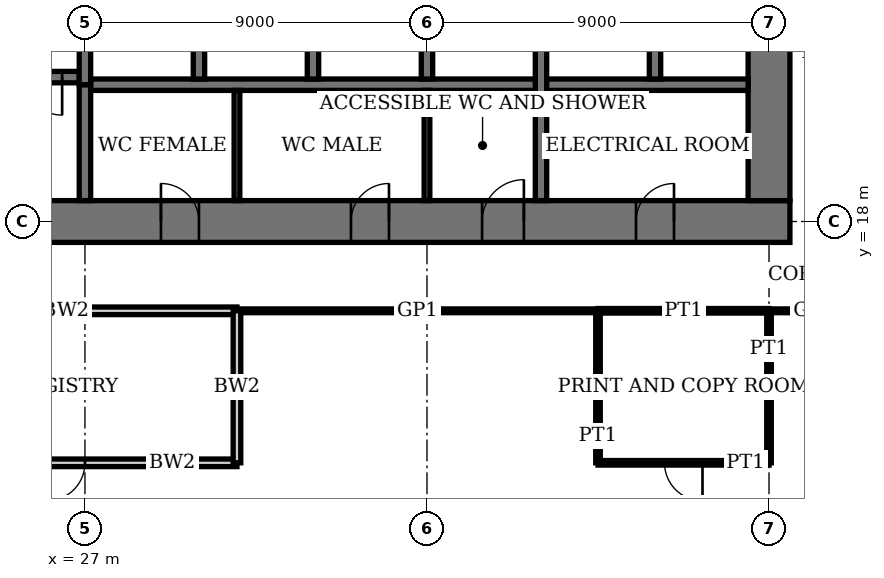
"""IFC4 building model, lengths in metres.
Left out: names, types, materials, properties, quantities, classifications, styles, units other than length and angle.
Written with IfcOpenShell. Run it as: python <this file> out.ifc"""

import sys

from ifc_helpers import new_model, si_unit, direction, frame, frame_2d, origin, place, context, subcontext, project, spatial, rectangle, extrude, element, fill, save


model = new_model("IFC4")
c1 = context("Model", 3, precision=1e-05, world=origin(), true_north=direction((0.0, 1.0)))
c2 = subcontext(c1, "Body", "Model", "MODEL_VIEW")
j1 = project(units=[si_unit("LENGTHUNIT", "METRE"), si_unit("PLANEANGLEUNIT", "RADIAN")], contexts=[c1])
p1 = place(None, origin())
s1 = spatial("IfcSite", under=j1, at=p1, CompositionType="ELEMENT")
p2 = place(p1, origin())
s2 = spatial("IfcBuilding", under=s1, at=p2, CompositionType="ELEMENT")
p3 = place(p2, frame((0.0, 0.0, 19.8)))
s3 = spatial("IfcBuildingStorey", under=s2, at=p3, CompositionType="ELEMENT", Elevation=19.8)
p4 = place(p3, frame((17.45, 18.0, 0.0), z_axis=(0.0, 0.0, 1.0), x_axis=(1.0, 0.0, 0.0)))
e1 = element("IfcWall", 1, at=p4, inside=s3, PredefinedType="SHEAR", context=c2, shape_type="SweptSolid", body=[
    extrude(rectangle(XDim=28.1, YDim=1.1, at=frame_2d((14.05, 0.0))), origin(), (0.0, 0.0, 1.0), 4.0),
])
p5 = place(p4, frame((11.55, 0.0, 0.0)))
e2 = element("IfcOpeningElement", 2, at=p5, cuts=e1, PredefinedType="OPENING", context=c2, shape_type="SweptSolid", body=[
    extrude(rectangle(XDim=1.0, YDim=2.4, at=frame_2d((0.5, 1.2))), frame((0.0, 0.56, 0.0), z_axis=(0.0, -1.0, 0.0), x_axis=(1.0, 0.0, 0.0)), (0.0, 0.0, 1.0), 1.12),
])
p6 = place(p4, frame((16.55, 0.0, 0.0)))
e3 = element("IfcOpeningElement", 3, at=p6, cuts=e1, PredefinedType="OPENING", context=c2, shape_type="SweptSolid", body=[
    extrude(rectangle(XDim=1.0, YDim=2.4, at=frame_2d((0.5, 1.2))), frame((0.0, 0.56, 0.0), z_axis=(0.0, -1.0, 0.0), x_axis=(1.0, 0.0, 0.0)), (0.0, 0.0, 1.0), 1.12),
])
p7 = place(p4, frame((20.0, 0.0, 0.0)))
e4 = element("IfcOpeningElement", 4, at=p7, cuts=e1, PredefinedType="OPENING", context=c2, shape_type="SweptSolid", body=[
    extrude(rectangle(XDim=1.1, YDim=2.4, at=frame_2d((0.55, 1.2))), frame((0.0, 0.56, 0.0), z_axis=(0.0, -1.0, 0.0), x_axis=(1.0, 0.0, 0.0)), (0.0, 0.0, 1.0), 1.12),
])
p8 = place(p4, frame((24.05, 0.0, 0.0)))
e5 = element("IfcOpeningElement", 5, at=p8, cuts=e1, PredefinedType="OPENING", context=c2, shape_type="SweptSolid", body=[
    extrude(rectangle(XDim=1.0, YDim=2.4, at=frame_2d((0.5, 1.2))), frame((0.0, 0.56, 0.0), z_axis=(0.0, -1.0, 0.0), x_axis=(1.0, 0.0, 0.0)), (0.0, 0.0, 1.0), 1.12),
])
p9 = place(p3, frame((45.0, 18.55, 0.0), z_axis=(0.0, 0.0, 1.0), x_axis=(0.0, 1.0, 0.0)))
e6 = element("IfcWall", 6, at=p9, inside=s3, PredefinedType="SHEAR", context=c2, shape_type="SweptSolid", body=[
    extrude(rectangle(XDim=16.9, YDim=1.1, at=frame_2d((8.45, 0.0))), origin(), (0.0, 0.0, 1.0), 4.0),
])
p10 = place(p9, frame((8.45, 0.0, 0.0)))
e7 = element("IfcOpeningElement", 7, at=p10, cuts=e6, PredefinedType="OPENING", context=c2, shape_type="SweptSolid", body=[
    extrude(rectangle(XDim=1.8, YDim=2.4, at=frame_2d((0.9, 1.2))), frame((0.0, 0.56, 0.0), z_axis=(0.0, -1.0, 0.0), x_axis=(1.0, 0.0, 0.0)), (0.0, 0.0, 1.0), 1.12),
])
p11 = place(p3, frame((18.55, 21.8, 0.0), z_axis=(0.0, 0.0, 1.0), x_axis=(1.0, 0.0, 0.0)))
e8 = element("IfcWall", 8, at=p11, inside=s3, PredefinedType="SHEAR", context=c2, shape_type="SweptSolid", body=[
    extrude(rectangle(XDim=8.3, YDim=0.3, at=frame_2d((4.15, 0.0))), origin(), (0.0, 0.0, 1.0), 4.0),
])
p12 = place(p11, frame((6.85, 0.0, 0.0)))
e9 = element("IfcOpeningElement", 9, at=p12, cuts=e8, PredefinedType="OPENING", context=c2, shape_type="SweptSolid", body=[
    extrude(rectangle(XDim=1.0, YDim=2.4, at=frame_2d((0.5, 1.2))), frame((0.0, 0.16, 0.0), z_axis=(0.0, -1.0, 0.0), x_axis=(1.0, 0.0, 0.0)), (0.0, 0.0, 1.0), 0.32),
])
p13 = place(p3, frame((27.0, 18.55, 0.0), z_axis=(0.0, 0.0, 1.0), x_axis=(0.0, 1.0, 0.0)))
e10 = element("IfcWall", 10, at=p13, inside=s3, PredefinedType="SHEAR", context=c2, shape_type="SweptSolid", body=[
    extrude(rectangle(XDim=3.05, YDim=0.3, at=frame_2d((1.525, 0.0))), origin(), (0.0, 0.0, 1.0), 4.0),
])
p14 = place(p3, frame((27.15, 21.6, 0.0), z_axis=(0.0, 0.0, 1.0), x_axis=(1.0, 0.0, 0.0)))
e11 = element("IfcWall", 11, at=p14, inside=s3, PredefinedType="SHEAR", context=c2, shape_type="SweptSolid", body=[
    extrude(rectangle(XDim=17.3, YDim=0.3, at=frame_2d((8.65, 0.0))), origin(), (0.0, 0.0, 1.0), 4.0),
])
for number, where, z_axis, x_axis in (
    (12, (30.0, 21.75, 0.0), (0.0, 0.0, 1.0), (0.0, 1.0, 0.0)),
    (13, (33.0, 21.75, 0.0), (0.0, 0.0, 1.0), (0.0, 1.0, 0.0)),
    (14, (36.0, 21.75, 0.0), (0.0, 0.0, 1.0), (0.0, 1.0, 0.0)),
):
    element("IfcWall", number, at=place(p3, frame(where, z_axis=z_axis, x_axis=x_axis)), inside=s3, PredefinedType="SHEAR", context=c2, shape_type="SweptSolid", body=[
        extrude(rectangle(XDim=2.7, YDim=0.3, at=frame_2d((1.35, 0.0))), origin(), (0.0, 0.0, 1.0), 4.0),
    ])
p15 = place(p3, frame((39.0, 18.55, 0.0), z_axis=(0.0, 0.0, 1.0), x_axis=(0.0, 1.0, 0.0)))
e15 = element("IfcWall", 15, at=p15, inside=s3, PredefinedType="SHEAR", context=c2, shape_type="SweptSolid", body=[
    extrude(rectangle(XDim=5.9, YDim=0.3, at=frame_2d((2.95, 0.0))), origin(), (0.0, 0.0, 1.0), 4.0),
])
p16 = place(p3, frame((42.0, 21.75, 0.0), z_axis=(0.0, 0.0, 1.0), x_axis=(0.0, 1.0, 0.0)))
e16 = element("IfcWall", 16, at=p16, inside=s3, PredefinedType="SHEAR", context=c2, shape_type="SweptSolid", body=[
    extrude(rectangle(XDim=2.7, YDim=0.3, at=frame_2d((1.35, 0.0))), origin(), (0.0, 0.0, 1.0), 4.0),
])
p17 = place(p3, frame((27.0, 21.6, 0.0), z_axis=(0.0, 0.0, 1.0), x_axis=(0.0, 1.0, 0.0)))
e17 = element("IfcWall", 17, at=p17, inside=s3, PredefinedType="SHEAR", context=c2, shape_type="SweptSolid", body=[
    extrude(rectangle(XDim=2.85, YDim=0.3, at=frame_2d((1.425, 0.0))), origin(), (0.0, 0.0, 1.0), 4.0),
])
p18 = place(p3, frame((22.0, 11.65, 0.0), z_axis=(0.0, 0.0, 1.0), x_axis=(1.0, 0.0, 0.0)))
e18 = element("IfcWall", 18, at=p18, inside=s3, PredefinedType="SOLIDWALL", context=c2, shape_type="SweptSolid", body=[
    extrude(rectangle(XDim=9.0, YDim=0.2, at=frame_2d((4.5, 0.0))), origin(), (0.0, 0.0, 1.0), 3.75),
])
p19 = place(p18, frame((4.0, 0.0, 0.0)))
e19 = element("IfcOpeningElement", 19, at=p19, cuts=e18, PredefinedType="OPENING", context=c2, shape_type="SweptSolid", body=[
    extrude(rectangle(XDim=1.0, YDim=2.4, at=frame_2d((0.5, 1.2))), frame((0.0, 0.11, 0.0), z_axis=(0.0, -1.0, 0.0), x_axis=(1.0, 0.0, 0.0)), (0.0, 0.0, 1.0), 0.22),
])
p20 = place(p3, frame((40.5, 11.65, 0.0), z_axis=(0.0, 0.0, 1.0), x_axis=(1.0, 0.0, 0.0)))
e20 = element("IfcWall", 20, at=p20, inside=s3, PredefinedType="PARTITIONING", context=c2, shape_type="SweptSolid", body=[
    extrude(rectangle(XDim=4.5, YDim=0.12, at=frame_2d((2.25, 0.0))), origin(), (0.0, 0.0, 1.0), 3.75),
])
p21 = place(p20, frame((1.75, 0.0, 0.0)))
e21 = element("IfcOpeningElement", 21, at=p21, cuts=e20, PredefinedType="OPENING", context=c2, shape_type="SweptSolid", body=[
    extrude(rectangle(XDim=1.0, YDim=2.4, at=frame_2d((0.5, 1.2))), frame((0.0, 0.07, 0.0), z_axis=(0.0, -1.0, 0.0), x_axis=(1.0, 0.0, 0.0)), (0.0, 0.0, 1.0), 0.14),
])
p22 = place(p3, frame((22.0, 15.65, 0.0), z_axis=(0.0, 0.0, 1.0), x_axis=(1.0, 0.0, 0.0)))
e22 = element("IfcWall", 22, at=p22, inside=s3, PredefinedType="SOLIDWALL", context=c2, shape_type="SweptSolid", body=[
    extrude(rectangle(XDim=9.0, YDim=0.2, at=frame_2d((4.5, 0.0))), origin(), (0.0, 0.0, 1.0), 3.75),
])
p23 = place(p3, frame((40.5, 15.65, 0.0), z_axis=(0.0, 0.0, 1.0), x_axis=(1.0, 0.0, 0.0)))
e23 = element("IfcWall", 23, at=p23, inside=s3, PredefinedType="PARTITIONING", context=c2, shape_type="SweptSolid", body=[
    extrude(rectangle(XDim=4.5, YDim=0.12, at=frame_2d((2.25, 0.0))), origin(), (0.0, 0.0, 1.0), 3.75),
])
p24 = place(p3, frame((31.0, 15.65, 0.0), z_axis=(0.0, 0.0, 1.0), x_axis=(1.0, 0.0, 0.0)))
e24 = element("IfcWall", 24, at=p24, inside=s3, PredefinedType="PARTITIONING", context=c2, shape_type="SweptSolid", body=[
    extrude(rectangle(XDim=9.5, YDim=0.1, at=frame_2d((4.75, 0.0))), origin(), (0.0, 0.0, 1.0), 3.75),
])
p25 = place(p3, frame((45.0, 15.65, 0.0), z_axis=(0.0, 0.0, 1.0), x_axis=(1.0, 0.0, 0.0)))
e25 = element("IfcWall", 25, at=p25, inside=s3, PredefinedType="PARTITIONING", context=c2, shape_type="SweptSolid", body=[
    extrude(rectangle(XDim=2.35, YDim=0.1, at=frame_2d((1.175, 0.0))), origin(), (0.0, 0.0, 1.0), 3.75),
])
p26 = place(p3, frame((31.0, 11.65, 0.0), z_axis=(0.0, 0.0, 1.0), x_axis=(0.0, 1.0, 0.0)))
e26 = element("IfcWall", 26, at=p26, inside=s3, PredefinedType="SOLIDWALL", context=c2, shape_type="SweptSolid", body=[
    extrude(rectangle(XDim=4.0, YDim=0.2, at=frame_2d((2.0, 0.0))), origin(), (0.0, 0.0, 1.0), 3.75),
])
p27 = place(p3, frame((40.5, 11.65, 0.0), z_axis=(0.0, 0.0, 1.0), x_axis=(0.0, 1.0, 0.0)))
e27 = element("IfcWall", 27, at=p27, inside=s3, PredefinedType="PARTITIONING", context=c2, shape_type="SweptSolid", body=[
    extrude(rectangle(XDim=4.0, YDim=0.12, at=frame_2d((2.0, 0.0))), origin(), (0.0, 0.0, 1.0), 3.75),
])
p28 = place(p3, frame((45.0, 11.65, 0.0), z_axis=(0.0, 0.0, 1.0), x_axis=(0.0, 1.0, 0.0)))
e28 = element("IfcWall", 28, at=p28, inside=s3, PredefinedType="PARTITIONING", context=c2, shape_type="SweptSolid", body=[
    extrude(rectangle(XDim=4.0, YDim=0.12, at=frame_2d((2.0, 0.0))), origin(), (0.0, 0.0, 1.0), 3.05),
])
for number, where, z_axis, x_axis in (
    (29, (31.0, 18.55, 0.0), (0.0, 0.0, 1.0), (0.0, 1.0, 0.0)),
    (30, (36.0, 18.55, 0.0), (0.0, 0.0, 1.0), (0.0, 1.0, 0.0)),
):
    element("IfcWall", number, at=place(p3, frame(where, z_axis=z_axis, x_axis=x_axis)), inside=s3, PredefinedType="PARTITIONING", context=c2, shape_type="SweptSolid", body=[
        extrude(rectangle(XDim=2.9, YDim=0.15, at=frame_2d((1.45, 0.0))), origin(), (0.0, 0.0, 1.0), 3.75),
    ])
p29 = place(p5, origin())
e31 = element("IfcDoor", 31, at=p29, inside=s3, OperationType="SINGLE_SWING_RIGHT", PredefinedType="DOOR", context=c2, shape_type="SweptSolid", body=[
    extrude(rectangle(XDim=1.0, YDim=2.4, at=frame_2d((0.5, 1.2))), frame((0.0, 0.025, 0.0), z_axis=(0.0, -1.0, 0.0), x_axis=(1.0, 0.0, 0.0)), (0.0, 0.0, 1.0), 0.05),
    extrude(rectangle(XDim=0.04, YDim=2.4, at=frame_2d((0.02, 1.2))), frame((0.0, 0.4, 0.0), z_axis=(0.0, -1.0, 0.0), x_axis=(1.0, 0.0, 0.0)), (0.0, 0.0, 1.0), 0.8),
    extrude(rectangle(XDim=0.04, YDim=2.4, at=frame_2d((0.98, 1.2))), frame((0.0, 0.4, 0.0), z_axis=(0.0, -1.0, 0.0), x_axis=(1.0, 0.0, 0.0)), (0.0, 0.0, 1.0), 0.8),
    extrude(rectangle(XDim=1.0, YDim=0.04, at=frame_2d((0.5, 2.38))), frame((0.0, 0.4, 0.0), z_axis=(0.0, -1.0, 0.0), x_axis=(1.0, 0.0, 0.0)), (0.0, 0.0, 1.0), 0.8),
])
fill(e2, e31)
p30 = place(p6, origin())
e32 = element("IfcDoor", 32, at=p30, inside=s3, OperationType="SINGLE_SWING_LEFT", PredefinedType="DOOR", context=c2, shape_type="SweptSolid", body=[
    extrude(rectangle(XDim=1.0, YDim=2.4, at=frame_2d((0.5, 1.2))), frame((0.0, 0.025, 0.0), z_axis=(0.0, -1.0, 0.0), x_axis=(1.0, 0.0, 0.0)), (0.0, 0.0, 1.0), 0.05),
    extrude(rectangle(XDim=0.04, YDim=2.4, at=frame_2d((0.02, 1.2))), frame((0.0, 0.4, 0.0), z_axis=(0.0, -1.0, 0.0), x_axis=(1.0, 0.0, 0.0)), (0.0, 0.0, 1.0), 0.8),
    extrude(rectangle(XDim=0.04, YDim=2.4, at=frame_2d((0.98, 1.2))), frame((0.0, 0.4, 0.0), z_axis=(0.0, -1.0, 0.0), x_axis=(1.0, 0.0, 0.0)), (0.0, 0.0, 1.0), 0.8),
    extrude(rectangle(XDim=1.0, YDim=0.04, at=frame_2d((0.5, 2.38))), frame((0.0, 0.4, 0.0), z_axis=(0.0, -1.0, 0.0), x_axis=(1.0, 0.0, 0.0)), (0.0, 0.0, 1.0), 0.8),
])
fill(e3, e32)
p31 = place(p7, origin())
e33 = element("IfcDoor", 33, at=p31, inside=s3, OperationType="SINGLE_SWING_LEFT", PredefinedType="DOOR", context=c2, shape_type="SweptSolid", body=[
    extrude(rectangle(XDim=1.1, YDim=2.4, at=frame_2d((0.55, 1.2))), frame((0.0, 0.025, 0.0), z_axis=(0.0, -1.0, 0.0), x_axis=(1.0, 0.0, 0.0)), (0.0, 0.0, 1.0), 0.05),
    extrude(rectangle(XDim=0.04, YDim=2.4, at=frame_2d((0.02, 1.2))), frame((0.0, 0.44, 0.0), z_axis=(0.0, -1.0, 0.0), x_axis=(1.0, 0.0, 0.0)), (0.0, 0.0, 1.0), 0.88),
    extrude(rectangle(XDim=0.04, YDim=2.4, at=frame_2d((1.08, 1.2))), frame((0.0, 0.44, 0.0), z_axis=(0.0, -1.0, 0.0), x_axis=(1.0, 0.0, 0.0)), (0.0, 0.0, 1.0), 0.88),
    extrude(rectangle(XDim=1.1, YDim=0.04, at=frame_2d((0.55, 2.38))), frame((0.0, 0.44, 0.0), z_axis=(0.0, -1.0, 0.0), x_axis=(1.0, 0.0, 0.0)), (0.0, 0.0, 1.0), 0.88),
])
fill(e4, e33)
p32 = place(p8, origin())
e34 = element("IfcDoor", 34, at=p32, inside=s3, OperationType="SINGLE_SWING_LEFT", PredefinedType="DOOR", context=c2, shape_type="SweptSolid", body=[
    extrude(rectangle(XDim=1.0, YDim=2.4, at=frame_2d((0.5, 1.2))), frame((0.0, 0.025, 0.0), z_axis=(0.0, -1.0, 0.0), x_axis=(1.0, 0.0, 0.0)), (0.0, 0.0, 1.0), 0.05),
    extrude(rectangle(XDim=0.04, YDim=2.4, at=frame_2d((0.02, 1.2))), frame((0.0, 0.4, 0.0), z_axis=(0.0, -1.0, 0.0), x_axis=(1.0, 0.0, 0.0)), (0.0, 0.0, 1.0), 0.8),
    extrude(rectangle(XDim=0.04, YDim=2.4, at=frame_2d((0.98, 1.2))), frame((0.0, 0.4, 0.0), z_axis=(0.0, -1.0, 0.0), x_axis=(1.0, 0.0, 0.0)), (0.0, 0.0, 1.0), 0.8),
    extrude(rectangle(XDim=1.0, YDim=0.04, at=frame_2d((0.5, 2.38))), frame((0.0, 0.4, 0.0), z_axis=(0.0, -1.0, 0.0), x_axis=(1.0, 0.0, 0.0)), (0.0, 0.0, 1.0), 0.8),
])
fill(e5, e34)
p33 = place(p12, origin())
e35 = element("IfcDoor", 35, at=p33, inside=s3, OperationType="SINGLE_SWING_RIGHT", PredefinedType="DOOR", context=c2, shape_type="SweptSolid", body=[
    extrude(rectangle(XDim=1.0, YDim=2.4, at=frame_2d((0.5, 1.2))), frame((0.0, 0.03, 0.0), z_axis=(0.0, -1.0, 0.0), x_axis=(1.0, 0.0, 0.0)), (0.0, 0.0, 1.0), 0.06),
])
fill(e9, e35)
p34 = place(p19, origin())
e36 = element("IfcDoor", 36, at=p34, inside=s3, OperationType="SINGLE_SWING_LEFT", PredefinedType="DOOR", context=c2, shape_type="SweptSolid", body=[
    extrude(rectangle(XDim=1.0, YDim=2.4, at=frame_2d((0.5, 1.2))), frame((0.0, 0.035, 0.0), z_axis=(0.0, -1.0, 0.0), x_axis=(1.0, 0.0, 0.0)), (0.0, 0.0, 1.0), 0.07),
])
fill(e19, e36)
p35 = place(p21, origin())
e37 = element("IfcDoor", 37, at=p35, inside=s3, OperationType="SINGLE_SWING_RIGHT", PredefinedType="DOOR", context=c2, shape_type="SweptSolid", body=[
    extrude(rectangle(XDim=1.0, YDim=2.4, at=frame_2d((0.5, 1.2))), frame((0.0, 0.025, 0.0), z_axis=(0.0, -1.0, 0.0), x_axis=(1.0, 0.0, 0.0)), (0.0, 0.0, 1.0), 0.05),
])
fill(e21, e37)
save(model, sys.argv[1])
